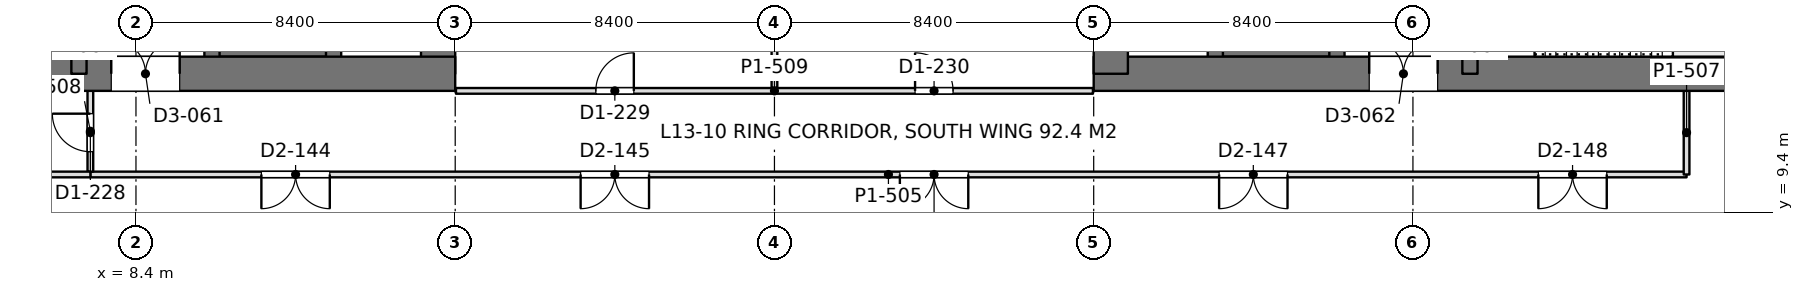
"""IFC4 building model, lengths in metres.
Left out: names, types, materials, properties, quantities, classifications, styles, units other than length and angle.
Written with IfcOpenShell. Run it as: python <this file> out.ifc"""

import sys

from ifc_helpers import new_model, si_unit, direction, frame, frame_2d, origin, place, context, subcontext, project, spatial, rectangle, extrude, element, fill, save


model = new_model("IFC4")
c1 = context("Model", 3, precision=1e-05, world=origin(), true_north=direction((0.0, 1.0)))
c2 = subcontext(c1, "Body", "Model", "MODEL_VIEW")
j1 = project(units=[si_unit("LENGTHUNIT", "METRE"), si_unit("PLANEANGLEUNIT", "RADIAN")], contexts=[c1])
p1 = place(None, origin())
s1 = spatial("IfcSite", under=j1, at=p1, CompositionType="ELEMENT")
p2 = place(p1, origin())
s2 = spatial("IfcBuilding", under=s1, at=p2, CompositionType="ELEMENT")
p3 = place(p2, frame((0.0, 0.0, 59.4)))
s3 = spatial("IfcBuildingStorey", under=s2, at=p3, CompositionType="ELEMENT", Elevation=59.4)
p4 = place(p3, frame((-1.2, 13.05, 0.0), z_axis=(0.0, 0.0, 1.0), x_axis=(1.0, 0.0, 0.0)))
e1 = element("IfcWall", 1, at=p4, inside=s3, PredefinedType="SHEAR", context=c2, shape_type="SweptSolid", body=[
    extrude(rectangle(XDim=18.0, YDim=0.9, at=frame_2d((9.0, 0.0))), origin(), (0.0, 0.0, 1.0), 4.5),
])
p5 = place(p4, frame((8.95, 0.0, 0.0)))
e2 = element("IfcOpeningElement", 2, at=p5, cuts=e1, PredefinedType="OPENING", context=c2, shape_type="SweptSolid", body=[
    extrude(rectangle(XDim=1.8, YDim=2.4, at=frame_2d((0.9, 1.2))), frame((0.0, 0.46, 0.0), z_axis=(0.0, -1.0, 0.0), x_axis=(1.0, 0.0, 0.0)), (0.0, 0.0, 1.0), 0.92),
])
p6 = place(p3, frame((16.35, 13.05, 0.0), z_axis=(0.0, 0.0, 1.0), x_axis=(0.0, 1.0, 0.0)))
e3 = element("IfcWall", 3, at=p6, inside=s3, PredefinedType="SHEAR", context=c2, shape_type="SweptSolid", body=[
    extrude(rectangle(XDim=24.3, YDim=0.9, at=frame_2d((12.15, 0.0))), origin(), (0.0, 0.0, 1.0), 4.5),
])
p7 = place(p3, frame((6.9, 13.05, 0.0), z_axis=(0.0, 0.0, 1.0), x_axis=(0.0, 1.0, 0.0)))
e4 = element("IfcWall", 4, at=p7, inside=s3, PredefinedType="SHEAR", context=c2, shape_type="SweptSolid", body=[
    extrude(rectangle(XDim=24.3, YDim=0.4, at=frame_2d((12.15, 0.0))), origin(), (0.0, 0.0, 1.0), 4.5),
])
p8 = place(p7, frame((1.3, 0.0, 0.0)))
e5 = element("IfcOpeningElement", 5, at=p8, cuts=e4, PredefinedType="OPENING", context=c2, shape_type="SweptSolid", body=[
    extrude(rectangle(XDim=1.0, YDim=2.2, at=frame_2d((0.5, 1.1))), frame((0.0, 0.21, 0.0), z_axis=(0.0, -1.0, 0.0), x_axis=(1.0, 0.0, 0.0)), (0.0, 0.0, 1.0), 0.42),
])
p9 = place(p7, frame((22.0, 0.0, 0.0)))
e6 = element("IfcOpeningElement", 6, at=p9, cuts=e4, PredefinedType="OPENING", context=c2, shape_type="SweptSolid", body=[
    extrude(rectangle(XDim=1.0, YDim=2.2, at=frame_2d((0.5, 1.1))), frame((0.0, 0.21, 0.0), z_axis=(0.0, -1.0, 0.0), x_axis=(1.0, 0.0, 0.0)), (0.0, 0.0, 1.0), 0.42),
])
p10 = place(p7, frame((5.55, 0.0, 0.0)))
e7 = element("IfcOpeningElement", 7, at=p10, cuts=e4, PredefinedType="OPENING", context=c2, shape_type="SweptSolid", body=[
    extrude(rectangle(XDim=1.0, YDim=2.2, at=frame_2d((0.5, 1.1))), frame((0.0, 0.21, 0.0), z_axis=(0.0, -1.0, 0.0), x_axis=(1.0, 0.0, 0.0)), (0.0, 0.0, 1.0), 0.42),
])
p11 = place(p7, frame((9.55, 0.0, 0.0)))
e8 = element("IfcOpeningElement", 8, at=p11, cuts=e4, PredefinedType="OPENING", context=c2, shape_type="SweptSolid", body=[
    extrude(rectangle(XDim=1.0, YDim=2.2, at=frame_2d((0.5, 1.1))), frame((0.0, 0.21, 0.0), z_axis=(0.0, -1.0, 0.0), x_axis=(1.0, 0.0, 0.0)), (0.0, 0.0, 1.0), 0.42),
])
p12 = place(p7, frame((12.8, 0.0, 0.0)))
e9 = element("IfcOpeningElement", 9, at=p12, cuts=e4, PredefinedType="OPENING", context=c2, shape_type="SweptSolid", body=[
    extrude(rectangle(XDim=1.1, YDim=2.2, at=frame_2d((0.55, 1.1))), frame((0.0, 0.21, 0.0), z_axis=(0.0, -1.0, 0.0), x_axis=(1.0, 0.0, 0.0)), (0.0, 0.0, 1.0), 0.42),
])
p13 = place(p7, frame((15.538, 0.0, 0.0)))
e10 = element("IfcOpeningElement", 10, at=p13, cuts=e4, PredefinedType="OPENING", context=c2, shape_type="SweptSolid", body=[
    extrude(rectangle(XDim=1.1, YDim=2.2, at=frame_2d((0.55, 1.1))), frame((0.0, 0.21, 0.0), z_axis=(0.0, -1.0, 0.0), x_axis=(1.0, 0.0, 0.0)), (0.0, 0.0, 1.0), 0.42),
])
p14 = place(p7, frame((18.262, 0.0, 0.0)))
e11 = element("IfcOpeningElement", 11, at=p14, cuts=e4, PredefinedType="OPENING", context=c2, shape_type="SweptSolid", body=[
    extrude(rectangle(XDim=1.1, YDim=2.2, at=frame_2d((0.55, 1.1))), frame((0.0, 0.21, 0.0), z_axis=(0.0, -1.0, 0.0), x_axis=(1.0, 0.0, 0.0)), (0.0, 0.0, 1.0), 0.42),
])
p15 = place(p3, frame((10.4, 13.05, 0.0), z_axis=(0.0, 0.0, 1.0), x_axis=(0.0, 1.0, 0.0)))
e12 = element("IfcWall", 12, at=p15, inside=s3, PredefinedType="SHEAR", context=c2, shape_type="SweptSolid", body=[
    extrude(rectangle(XDim=24.3, YDim=0.4, at=frame_2d((12.15, 0.0))), origin(), (0.0, 0.0, 1.0), 4.5),
])
p16 = place(p15, frame((1.5, 0.0, 0.0)))
e13 = element("IfcOpeningElement", 13, at=p16, cuts=e12, PredefinedType="OPENING", context=c2, shape_type="SweptSolid", body=[
    extrude(rectangle(XDim=1.1, YDim=2.2, at=frame_2d((0.55, 1.1))), frame((0.0, 0.21, 0.0), z_axis=(0.0, -1.0, 0.0), x_axis=(1.0, 0.0, 0.0)), (0.0, 0.0, 1.0), 0.42),
])
p17 = place(p15, frame((4.35, 0.0, 0.0)))
e14 = element("IfcOpeningElement", 14, at=p17, cuts=e12, PredefinedType="OPENING", context=c2, shape_type="SweptSolid", body=[
    extrude(rectangle(XDim=1.1, YDim=2.2, at=frame_2d((0.55, 1.1))), frame((0.0, 0.21, 0.0), z_axis=(0.0, -1.0, 0.0), x_axis=(1.0, 0.0, 0.0)), (0.0, 0.0, 1.0), 0.42),
])
p18 = place(p15, frame((7.2, 0.0, 0.0)))
e15 = element("IfcOpeningElement", 15, at=p18, cuts=e12, PredefinedType="OPENING", context=c2, shape_type="SweptSolid", body=[
    extrude(rectangle(XDim=1.1, YDim=2.2, at=frame_2d((0.55, 1.1))), frame((0.0, 0.21, 0.0), z_axis=(0.0, -1.0, 0.0), x_axis=(1.0, 0.0, 0.0)), (0.0, 0.0, 1.0), 0.42),
])
p19 = place(p15, frame((21.45, 0.0, 0.0)))
e16 = element("IfcOpeningElement", 16, at=p19, cuts=e12, PredefinedType="OPENING", context=c2, shape_type="SweptSolid", body=[
    extrude(rectangle(XDim=1.1, YDim=2.2, at=frame_2d((0.55, 1.1))), frame((0.0, 0.21, 0.0), z_axis=(0.0, -1.0, 0.0), x_axis=(1.0, 0.0, 0.0)), (0.0, 0.0, 1.0), 0.42),
])
p20 = place(p3, frame((13.6, 13.05, 0.0), z_axis=(0.0, 0.0, 1.0), x_axis=(0.0, 1.0, 0.0)))
e17 = element("IfcWall", 17, at=p20, inside=s3, PredefinedType="SHEAR", context=c2, shape_type="SweptSolid", body=[
    extrude(rectangle(XDim=24.3, YDim=0.4, at=frame_2d((12.15, 0.0))), origin(), (0.0, 0.0, 1.0), 4.5),
])
p21 = place(p3, frame((10.4, 13.65, 0.0), z_axis=(0.0, 0.0, 1.0), x_axis=(1.0, 0.0, 0.0)))
e18 = element("IfcWall", 18, at=p21, inside=s3, PredefinedType="SHEAR", context=c2, shape_type="SweptSolid", body=[
    extrude(rectangle(XDim=3.2, YDim=0.3, at=frame_2d((1.6, 0.0))), origin(), (0.0, 0.0, 1.0), 4.5),
])
p22 = place(p3, frame((33.6, 13.05, 0.0), z_axis=(0.0, 0.0, 1.0), x_axis=(1.0, 0.0, 0.0)))
e19 = element("IfcWall", 19, at=p22, inside=s3, PredefinedType="SHEAR", context=c2, shape_type="SweptSolid", body=[
    extrude(rectangle(XDim=18.0, YDim=0.9, at=frame_2d((9.0, 0.0))), origin(), (0.0, 0.0, 1.0), 4.5),
])
p23 = place(p22, frame((7.25, 0.0, 0.0)))
e20 = element("IfcOpeningElement", 20, at=p23, cuts=e19, PredefinedType="OPENING", context=c2, shape_type="SweptSolid", body=[
    extrude(rectangle(XDim=1.8, YDim=2.4, at=frame_2d((0.9, 1.2))), frame((0.0, 0.46, 0.0), z_axis=(0.0, -1.0, 0.0), x_axis=(1.0, 0.0, 0.0)), (0.0, 0.0, 1.0), 0.92),
])
p24 = place(p3, frame((34.05, 13.05, 0.0), z_axis=(0.0, 0.0, 1.0), x_axis=(0.0, 1.0, 0.0)))
e21 = element("IfcWall", 21, at=p24, inside=s3, PredefinedType="SHEAR", context=c2, shape_type="SweptSolid", body=[
    extrude(rectangle(XDim=24.3, YDim=0.9, at=frame_2d((12.15, 0.0))), origin(), (0.0, 0.0, 1.0), 4.5),
])
p25 = place(p3, frame((43.5, 13.05, 0.0), z_axis=(0.0, 0.0, 1.0), x_axis=(0.0, 1.0, 0.0)))
e22 = element("IfcWall", 22, at=p25, inside=s3, PredefinedType="SHEAR", context=c2, shape_type="SweptSolid", body=[
    extrude(rectangle(XDim=24.3, YDim=0.4, at=frame_2d((12.15, 0.0))), origin(), (0.0, 0.0, 1.0), 4.5),
])
p26 = place(p25, frame((1.3, 0.0, 0.0)))
e23 = element("IfcOpeningElement", 23, at=p26, cuts=e22, PredefinedType="OPENING", context=c2, shape_type="SweptSolid", body=[
    extrude(rectangle(XDim=1.0, YDim=2.2, at=frame_2d((0.5, 1.1))), frame((0.0, 0.21, 0.0), z_axis=(0.0, -1.0, 0.0), x_axis=(1.0, 0.0, 0.0)), (0.0, 0.0, 1.0), 0.42),
])
p27 = place(p25, frame((22.0, 0.0, 0.0)))
e24 = element("IfcOpeningElement", 24, at=p27, cuts=e22, PredefinedType="OPENING", context=c2, shape_type="SweptSolid", body=[
    extrude(rectangle(XDim=1.0, YDim=2.2, at=frame_2d((0.5, 1.1))), frame((0.0, 0.21, 0.0), z_axis=(0.0, -1.0, 0.0), x_axis=(1.0, 0.0, 0.0)), (0.0, 0.0, 1.0), 0.42),
])
p28 = place(p25, frame((5.55, 0.0, 0.0)))
e25 = element("IfcOpeningElement", 25, at=p28, cuts=e22, PredefinedType="OPENING", context=c2, shape_type="SweptSolid", body=[
    extrude(rectangle(XDim=1.0, YDim=2.2, at=frame_2d((0.5, 1.1))), frame((0.0, 0.21, 0.0), z_axis=(0.0, -1.0, 0.0), x_axis=(1.0, 0.0, 0.0)), (0.0, 0.0, 1.0), 0.42),
])
p29 = place(p25, frame((9.55, 0.0, 0.0)))
e26 = element("IfcOpeningElement", 26, at=p29, cuts=e22, PredefinedType="OPENING", context=c2, shape_type="SweptSolid", body=[
    extrude(rectangle(XDim=1.0, YDim=2.2, at=frame_2d((0.5, 1.1))), frame((0.0, 0.21, 0.0), z_axis=(0.0, -1.0, 0.0), x_axis=(1.0, 0.0, 0.0)), (0.0, 0.0, 1.0), 0.42),
])
p30 = place(p25, frame((12.8, 0.0, 0.0)))
e27 = element("IfcOpeningElement", 27, at=p30, cuts=e22, PredefinedType="OPENING", context=c2, shape_type="SweptSolid", body=[
    extrude(rectangle(XDim=1.1, YDim=2.2, at=frame_2d((0.55, 1.1))), frame((0.0, 0.21, 0.0), z_axis=(0.0, -1.0, 0.0), x_axis=(1.0, 0.0, 0.0)), (0.0, 0.0, 1.0), 0.42),
])
p31 = place(p25, frame((15.538, 0.0, 0.0)))
e28 = element("IfcOpeningElement", 28, at=p31, cuts=e22, PredefinedType="OPENING", context=c2, shape_type="SweptSolid", body=[
    extrude(rectangle(XDim=1.1, YDim=2.2, at=frame_2d((0.55, 1.1))), frame((0.0, 0.21, 0.0), z_axis=(0.0, -1.0, 0.0), x_axis=(1.0, 0.0, 0.0)), (0.0, 0.0, 1.0), 0.42),
])
p32 = place(p25, frame((18.262, 0.0, 0.0)))
e29 = element("IfcOpeningElement", 29, at=p32, cuts=e22, PredefinedType="OPENING", context=c2, shape_type="SweptSolid", body=[
    extrude(rectangle(XDim=1.1, YDim=2.2, at=frame_2d((0.55, 1.1))), frame((0.0, 0.21, 0.0), z_axis=(0.0, -1.0, 0.0), x_axis=(1.0, 0.0, 0.0)), (0.0, 0.0, 1.0), 0.42),
])
p33 = place(p3, frame((40.0, 13.05, 0.0), z_axis=(0.0, 0.0, 1.0), x_axis=(0.0, 1.0, 0.0)))
e30 = element("IfcWall", 30, at=p33, inside=s3, PredefinedType="SHEAR", context=c2, shape_type="SweptSolid", body=[
    extrude(rectangle(XDim=24.3, YDim=0.4, at=frame_2d((12.15, 0.0))), origin(), (0.0, 0.0, 1.0), 4.5),
])
p34 = place(p33, frame((1.5, 0.0, 0.0)))
e31 = element("IfcOpeningElement", 31, at=p34, cuts=e30, PredefinedType="OPENING", context=c2, shape_type="SweptSolid", body=[
    extrude(rectangle(XDim=1.1, YDim=2.2, at=frame_2d((0.55, 1.1))), frame((0.0, 0.21, 0.0), z_axis=(0.0, -1.0, 0.0), x_axis=(1.0, 0.0, 0.0)), (0.0, 0.0, 1.0), 0.42),
])
p35 = place(p33, frame((4.35, 0.0, 0.0)))
e32 = element("IfcOpeningElement", 32, at=p35, cuts=e30, PredefinedType="OPENING", context=c2, shape_type="SweptSolid", body=[
    extrude(rectangle(XDim=1.1, YDim=2.2, at=frame_2d((0.55, 1.1))), frame((0.0, 0.21, 0.0), z_axis=(0.0, -1.0, 0.0), x_axis=(1.0, 0.0, 0.0)), (0.0, 0.0, 1.0), 0.42),
])
p36 = place(p33, frame((7.2, 0.0, 0.0)))
e33 = element("IfcOpeningElement", 33, at=p36, cuts=e30, PredefinedType="OPENING", context=c2, shape_type="SweptSolid", body=[
    extrude(rectangle(XDim=1.1, YDim=2.2, at=frame_2d((0.55, 1.1))), frame((0.0, 0.21, 0.0), z_axis=(0.0, -1.0, 0.0), x_axis=(1.0, 0.0, 0.0)), (0.0, 0.0, 1.0), 0.42),
])
p37 = place(p33, frame((21.45, 0.0, 0.0)))
e34 = element("IfcOpeningElement", 34, at=p37, cuts=e30, PredefinedType="OPENING", context=c2, shape_type="SweptSolid", body=[
    extrude(rectangle(XDim=1.1, YDim=2.2, at=frame_2d((0.55, 1.1))), frame((0.0, 0.21, 0.0), z_axis=(0.0, -1.0, 0.0), x_axis=(1.0, 0.0, 0.0)), (0.0, 0.0, 1.0), 0.42),
])
p38 = place(p3, frame((36.8, 13.05, 0.0), z_axis=(0.0, 0.0, 1.0), x_axis=(0.0, 1.0, 0.0)))
e35 = element("IfcWall", 35, at=p38, inside=s3, PredefinedType="SHEAR", context=c2, shape_type="SweptSolid", body=[
    extrude(rectangle(XDim=24.3, YDim=0.4, at=frame_2d((12.15, 0.0))), origin(), (0.0, 0.0, 1.0), 4.5),
])
p39 = place(p3, frame((40.0, 13.65, 0.0), z_axis=(0.0, 0.0, 1.0), x_axis=(-1.0, 0.0, 0.0)))
e36 = element("IfcWall", 36, at=p39, inside=s3, PredefinedType="SHEAR", context=c2, shape_type="SweptSolid", body=[
    extrude(rectangle(XDim=3.2, YDim=0.3, at=frame_2d((1.6, 0.0))), origin(), (0.0, 0.0, 1.0), 4.5),
])
p40 = place(p3, frame((7.198, 10.4, 0.0), z_axis=(0.0, 0.0, 1.0), x_axis=(1.0, 0.0, 0.0)))
e37 = element("IfcWall", 37, at=p40, inside=s3, PredefinedType="PARTITIONING", context=c2, shape_type="SweptSolid", body=[
    extrude(rectangle(XDim=42.002, YDim=0.15, at=frame_2d((21.001, 0.0))), origin(), (0.0, 0.0, 1.0), 3.74),
])
p41 = place(p40, frame((4.502, 0.0, 0.0)))
e38 = element("IfcOpeningElement", 38, at=p41, cuts=e37, PredefinedType="OPENING", context=c2, shape_type="SweptSolid", body=[
    extrude(rectangle(XDim=1.8, YDim=2.2, at=frame_2d((0.9, 1.1))), frame((0.0, 0.085, 0.0), z_axis=(0.0, -1.0, 0.0), x_axis=(1.0, 0.0, 0.0)), (0.0, 0.0, 1.0), 0.17),
])
p42 = place(p40, frame((12.902, 0.0, 0.0)))
e39 = element("IfcOpeningElement", 39, at=p42, cuts=e37, PredefinedType="OPENING", context=c2, shape_type="SweptSolid", body=[
    extrude(rectangle(XDim=1.8, YDim=2.2, at=frame_2d((0.9, 1.1))), frame((0.0, 0.085, 0.0), z_axis=(0.0, -1.0, 0.0), x_axis=(1.0, 0.0, 0.0)), (0.0, 0.0, 1.0), 0.17),
])
p43 = place(p40, frame((21.302, 0.0, 0.0)))
e40 = element("IfcOpeningElement", 40, at=p43, cuts=e37, PredefinedType="OPENING", context=c2, shape_type="SweptSolid", body=[
    extrude(rectangle(XDim=1.8, YDim=2.2, at=frame_2d((0.9, 1.1))), frame((0.0, 0.085, 0.0), z_axis=(0.0, -1.0, 0.0), x_axis=(1.0, 0.0, 0.0)), (0.0, 0.0, 1.0), 0.17),
])
p44 = place(p40, frame((29.702, 0.0, 0.0)))
e41 = element("IfcOpeningElement", 41, at=p44, cuts=e37, PredefinedType="OPENING", context=c2, shape_type="SweptSolid", body=[
    extrude(rectangle(XDim=1.8, YDim=2.2, at=frame_2d((0.9, 1.1))), frame((0.0, 0.085, 0.0), z_axis=(0.0, -1.0, 0.0), x_axis=(1.0, 0.0, 0.0)), (0.0, 0.0, 1.0), 0.17),
])
p45 = place(p40, frame((38.102, 0.0, 0.0)))
e42 = element("IfcOpeningElement", 42, at=p45, cuts=e37, PredefinedType="OPENING", context=c2, shape_type="SweptSolid", body=[
    extrude(rectangle(XDim=1.8, YDim=2.2, at=frame_2d((0.9, 1.1))), frame((0.0, 0.085, 0.0), z_axis=(0.0, -1.0, 0.0), x_axis=(1.0, 0.0, 0.0)), (0.0, 0.0, 1.0), 0.17),
])
p46 = place(p3, frame((7.2, 10.474, 0.0), z_axis=(0.0, 0.0, 1.0), x_axis=(0.0, 1.0, 0.0)))
e43 = element("IfcWall", 43, at=p46, inside=s3, PredefinedType="PARTITIONING", context=c2, shape_type="SweptSolid", body=[
    extrude(rectangle(XDim=2.128, YDim=0.15, at=frame_2d((1.064, 0.0))), origin(), (0.0, 0.0, 1.0), 4.34),
])
p47 = place(p46, frame((0.526, 0.0, 0.0)))
e44 = element("IfcOpeningElement", 44, at=p47, cuts=e43, PredefinedType="OPENING", context=c2, shape_type="SweptSolid", body=[
    extrude(rectangle(XDim=1.0, YDim=2.2, at=frame_2d((0.5, 1.1))), frame((0.0, 0.085, 0.0), z_axis=(0.0, -1.0, 0.0), x_axis=(1.0, 0.0, 0.0)), (0.0, 0.0, 1.0), 0.17),
])
p48 = place(p3, frame((49.2, 10.4, 0.0), z_axis=(0.0, 0.0, 1.0), x_axis=(0.0, 1.0, 0.0)))
e45 = element("IfcWall", 45, at=p48, inside=s3, PredefinedType="PARTITIONING", context=c2, shape_type="SweptSolid", body=[
    extrude(rectangle(XDim=2.202, YDim=0.15, at=frame_2d((1.101, 0.0))), origin(), (0.0, 0.0, 1.0), 4.34),
])
p49 = place(p3, frame((1.2, 10.4, 0.0), z_axis=(0.0, 0.0, 1.0), x_axis=(1.0, 0.0, 0.0)))
e46 = element("IfcWall", 46, at=p49, inside=s3, PredefinedType="PARTITIONING", context=c2, shape_type="SweptSolid", body=[
    extrude(rectangle(XDim=6.002, YDim=0.15, at=frame_2d((3.001, 0.0))), origin(), (0.0, 0.0, 1.0), 4.34),
])
p50 = place(p3, frame((25.2, 12.674, 0.0), z_axis=(0.0, 0.0, 1.0), x_axis=(0.0, 1.0, 0.0)))
e47 = element("IfcWall", 47, at=p50, inside=s3, PredefinedType="PARTITIONING", context=c2, shape_type="SweptSolid", body=[
    extrude(rectangle(XDim=3.527, YDim=0.15, at=frame_2d((1.763, 0.0))), origin(), (0.0, 0.0, 1.0), 3.74),
])
p51 = place(p3, frame((16.82, 12.6, 0.0), z_axis=(0.0, 0.0, 1.0), x_axis=(1.0, 0.0, 0.0)))
e48 = element("IfcWall", 48, at=p51, inside=s3, PredefinedType="PARTITIONING", context=c2, shape_type="SweptSolid", body=[
    extrude(rectangle(XDim=16.76, YDim=0.15, at=frame_2d((8.38, 0.0))), origin(), (0.0, 0.0, 1.0), 3.74),
])
p52 = place(p51, frame((3.68, 0.0, 0.0)))
e49 = element("IfcOpeningElement", 49, at=p52, cuts=e48, PredefinedType="OPENING", context=c2, shape_type="SweptSolid", body=[
    extrude(rectangle(XDim=1.0, YDim=2.2, at=frame_2d((0.5, 1.1))), frame((0.0, 0.085, 0.0), z_axis=(0.0, -1.0, 0.0), x_axis=(1.0, 0.0, 0.0)), (0.0, 0.0, 1.0), 0.17),
])
p53 = place(p51, frame((12.08, 0.0, 0.0)))
e50 = element("IfcOpeningElement", 50, at=p53, cuts=e48, PredefinedType="OPENING", context=c2, shape_type="SweptSolid", body=[
    extrude(rectangle(XDim=1.0, YDim=2.2, at=frame_2d((0.5, 1.1))), frame((0.0, 0.085, 0.0), z_axis=(0.0, -1.0, 0.0), x_axis=(1.0, 0.0, 0.0)), (0.0, 0.0, 1.0), 0.17),
])
p54 = place(p5, origin())
e51 = element("IfcDoor", 51, at=p54, inside=s3, OperationType="DOUBLE_DOOR_SINGLE_SWING", PredefinedType="DOOR", context=c2, shape_type="SweptSolid", body=[
    extrude(rectangle(XDim=1.8, YDim=2.4, at=frame_2d((0.9, 1.2))), frame((0.0, 0.025, 0.0), z_axis=(0.0, -1.0, 0.0), x_axis=(1.0, 0.0, 0.0)), (0.0, 0.0, 1.0), 0.05),
])
fill(e2, e51)
p55 = place(p23, origin())
e52 = element("IfcDoor", 52, at=p55, inside=s3, OperationType="DOUBLE_DOOR_SINGLE_SWING", PredefinedType="DOOR", context=c2, shape_type="SweptSolid", body=[
    extrude(rectangle(XDim=1.8, YDim=2.4, at=frame_2d((0.9, 1.2))), frame((0.0, 0.025, 0.0), z_axis=(0.0, -1.0, 0.0), x_axis=(1.0, 0.0, 0.0)), (0.0, 0.0, 1.0), 0.05),
])
fill(e20, e52)
p56 = place(p41, frame((1.8, 0.0, 0.0), z_axis=(0.0, 0.0, 1.0), x_axis=(-1.0, 0.0, 0.0)))
e53 = element("IfcDoor", 53, at=p56, inside=s3, OperationType="DOUBLE_DOOR_SINGLE_SWING", PredefinedType="DOOR", context=c2, shape_type="SweptSolid", body=[
    extrude(rectangle(XDim=1.8, YDim=2.2, at=frame_2d((0.9, 1.1))), frame((0.0, 0.025, 0.0), z_axis=(0.0, -1.0, 0.0), x_axis=(1.0, 0.0, 0.0)), (0.0, 0.0, 1.0), 0.05),
])
fill(e38, e53)
p57 = place(p42, frame((1.8, 0.0, 0.0), z_axis=(0.0, 0.0, 1.0), x_axis=(-1.0, 0.0, 0.0)))
e54 = element("IfcDoor", 54, at=p57, inside=s3, OperationType="DOUBLE_DOOR_SINGLE_SWING", PredefinedType="DOOR", context=c2, shape_type="SweptSolid", body=[
    extrude(rectangle(XDim=1.8, YDim=2.2, at=frame_2d((0.9, 1.1))), frame((0.0, 0.025, 0.0), z_axis=(0.0, -1.0, 0.0), x_axis=(1.0, 0.0, 0.0)), (0.0, 0.0, 1.0), 0.05),
])
fill(e39, e54)
p58 = place(p43, frame((1.8, 0.0, 0.0), z_axis=(0.0, 0.0, 1.0), x_axis=(-1.0, 0.0, 0.0)))
e55 = element("IfcDoor", 55, at=p58, inside=s3, OperationType="DOUBLE_DOOR_SINGLE_SWING", PredefinedType="DOOR", context=c2, shape_type="SweptSolid", body=[
    extrude(rectangle(XDim=1.8, YDim=2.2, at=frame_2d((0.9, 1.1))), frame((0.0, 0.025, 0.0), z_axis=(0.0, -1.0, 0.0), x_axis=(1.0, 0.0, 0.0)), (0.0, 0.0, 1.0), 0.05),
])
fill(e40, e55)
p59 = place(p44, frame((1.8, 0.0, 0.0), z_axis=(0.0, 0.0, 1.0), x_axis=(-1.0, 0.0, 0.0)))
e56 = element("IfcDoor", 56, at=p59, inside=s3, OperationType="DOUBLE_DOOR_SINGLE_SWING", PredefinedType="DOOR", context=c2, shape_type="SweptSolid", body=[
    extrude(rectangle(XDim=1.8, YDim=2.2, at=frame_2d((0.9, 1.1))), frame((0.0, 0.025, 0.0), z_axis=(0.0, -1.0, 0.0), x_axis=(1.0, 0.0, 0.0)), (0.0, 0.0, 1.0), 0.05),
])
fill(e41, e56)
p60 = place(p45, frame((1.8, 0.0, 0.0), z_axis=(0.0, 0.0, 1.0), x_axis=(-1.0, 0.0, 0.0)))
e57 = element("IfcDoor", 57, at=p60, inside=s3, OperationType="DOUBLE_DOOR_SINGLE_SWING", PredefinedType="DOOR", context=c2, shape_type="SweptSolid", body=[
    extrude(rectangle(XDim=1.8, YDim=2.2, at=frame_2d((0.9, 1.1))), frame((0.0, 0.025, 0.0), z_axis=(0.0, -1.0, 0.0), x_axis=(1.0, 0.0, 0.0)), (0.0, 0.0, 1.0), 0.05),
])
fill(e42, e57)
p61 = place(p47, origin())
e58 = element("IfcDoor", 58, at=p61, inside=s3, OperationType="SINGLE_SWING_RIGHT", PredefinedType="DOOR", context=c2, shape_type="SweptSolid", body=[
    extrude(rectangle(XDim=1.0, YDim=2.2, at=frame_2d((0.5, 1.1))), frame((0.0, 0.025, 0.0), z_axis=(0.0, -1.0, 0.0), x_axis=(1.0, 0.0, 0.0)), (0.0, 0.0, 1.0), 0.05),
])
fill(e44, e58)
p62 = place(p52, origin())
e59 = element("IfcDoor", 59, at=p62, inside=s3, OperationType="SINGLE_SWING_RIGHT", PredefinedType="DOOR", context=c2, shape_type="SweptSolid", body=[
    extrude(rectangle(XDim=1.0, YDim=2.2, at=frame_2d((0.5, 1.1))), frame((0.0, 0.025, 0.0), z_axis=(0.0, -1.0, 0.0), x_axis=(1.0, 0.0, 0.0)), (0.0, 0.0, 1.0), 0.05),
])
fill(e49, e59)
p63 = place(p53, origin())
e60 = element("IfcDoor", 60, at=p63, inside=s3, OperationType="SINGLE_SWING_LEFT", PredefinedType="DOOR", context=c2, shape_type="SweptSolid", body=[
    extrude(rectangle(XDim=1.0, YDim=2.2, at=frame_2d((0.5, 1.1))), frame((0.0, 0.025, 0.0), z_axis=(0.0, -1.0, 0.0), x_axis=(1.0, 0.0, 0.0)), (0.0, 0.0, 1.0), 0.05),
])
fill(e50, e60)
save(model, sys.argv[1])
